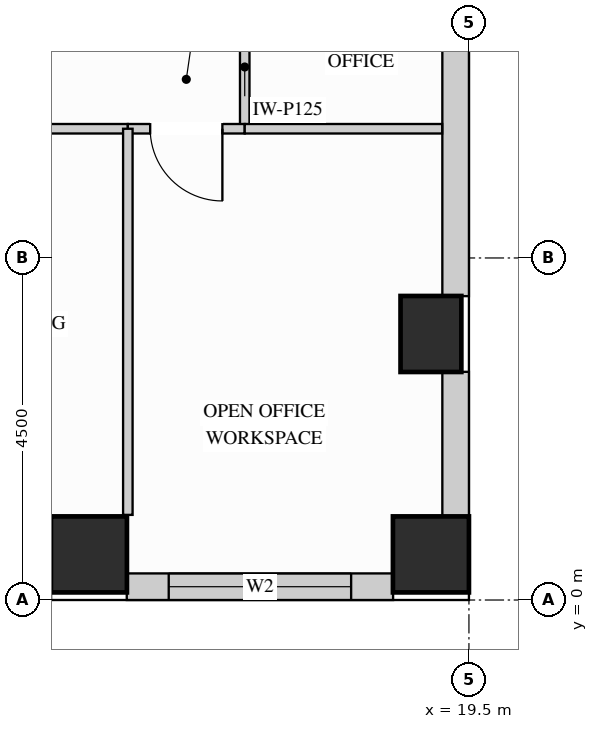
"""IFC4 building model, lengths in metres.
Left out: names, types, materials, properties, quantities, classifications, styles, units other than length and angle.
Written with IfcOpenShell. Run it as: python <this file> out.ifc"""

import sys

from ifc_helpers import new_model, si_unit, direction, frame, frame_2d, origin, origin_2d, place, context, subcontext, project, spatial, rectangle, extrude, source, transform, mapped, element, fill, save


model = new_model("IFC4")
c1 = context("Model", 3, precision=1e-05, world=origin(), true_north=direction((0.0, 1.0)))
c2 = subcontext(c1, "Body", "Model", "MODEL_VIEW")
j1 = project(units=[si_unit("LENGTHUNIT", "METRE"), si_unit("PLANEANGLEUNIT", "RADIAN")], contexts=[c1])
p1 = place(None, origin())
s1 = spatial("IfcSite", under=j1, at=p1, CompositionType="ELEMENT")
p2 = place(p1, origin())
s2 = spatial("IfcBuilding", under=s1, at=p2, CompositionType="ELEMENT")
p3 = place(p2, frame((0.0, 0.0, 204.3)))
s3 = spatial("IfcBuildingStorey", under=s2, at=p3, CompositionType="ELEMENT", Elevation=204.3)
m1 = source(origin(), c2, "Body", "SweptSolid", [
    extrude(rectangle(XDim=0.8, YDim=1.0, at=origin_2d()), origin(), (0.0, 0.0, 1.0), 3.32),
])
p4 = place(p3, frame((19.0, 3.5, 0.0), z_axis=(0.0, 0.0, 1.0), x_axis=(1.0, 0.0, 0.0)))
e1 = element("IfcColumn", 1, at=p4, inside=s3, PredefinedType="COLUMN", context=c2, shape_type="MappedRepresentation", body=[
    mapped(m1, transform((0.0, 0.0, 0.0), x_axis=(1.0, 0.0, 0.0), y_axis=(0.0, 1.0, 0.0), z_axis=(0.0, 0.0, 1.0))),
])
m2 = source(origin(), c2, "Body", "SweptSolid", [
    extrude(rectangle(XDim=1.0, YDim=1.0, at=origin_2d()), origin(), (0.0, 0.0, 1.0), 3.32),
])
for number, where, z_axis, x_axis in (
    (2, (14.5, 0.6, 0.0), (0.0, 0.0, 1.0), (1.0, 0.0, 0.0)),
    (3, (19.0, 0.6, 0.0), (0.0, 0.0, 1.0), (1.0, 0.0, 0.0)),
):
    element("IfcColumn", number, at=place(p3, frame(where, z_axis=z_axis, x_axis=x_axis)), inside=s3, PredefinedType="COLUMN", context=c2, shape_type="MappedRepresentation", body=[
        mapped(m2, transform((0.0, 0.0, 0.0), x_axis=(1.0, 0.0, 0.0), y_axis=(0.0, 1.0, 0.0), z_axis=(0.0, 0.0, 1.0))),
    ])
p5 = place(p3, frame((14.998, 0.175, 0.0), z_axis=(0.0, 0.0, 1.0), x_axis=(1.0, 0.0, 0.0)))
e4 = element("IfcWall", 4, at=p5, inside=s3, PredefinedType="SOLIDWALL", context=c2, shape_type="SweptSolid", body=[
    extrude(rectangle(XDim=3.504, YDim=0.35, at=frame_2d((1.752, 0.0))), origin(), (0.0, 0.0, 1.0), 2.532),
])
p6 = place(p5, frame((0.552, 0.0, 0.78)))
e5 = element("IfcOpeningElement", 5, at=p6, cuts=e4, PredefinedType="OPENING", context=c2, shape_type="SweptSolid", body=[
    extrude(rectangle(XDim=2.4, YDim=1.572, at=frame_2d((1.2, 0.786))), frame((0.0, 0.185, 0.0), z_axis=(0.0, -1.0, 0.0), x_axis=(1.0, 0.0, 0.0)), (0.0, 0.0, 1.0), 0.37),
])
m3 = source(origin(), c2, "Body", "SweptSolid", [
    extrude(rectangle(XDim=1.904, YDim=0.35, at=frame_2d((0.952, 0.0))), origin(), (0.0, 0.0, 1.0), 2.532),
])
p7 = place(p3, frame((19.325, 1.098, 0.0), z_axis=(0.0, 0.0, 1.0), x_axis=(0.0, 1.0, 0.0)))
e6 = element("IfcWall", 6, at=p7, inside=s3, PredefinedType="SOLIDWALL", context=c2, shape_type="MappedRepresentation", body=[
    mapped(m3, transform((0.0, 0.0, 0.0), x_axis=(1.0, 0.0, 0.0), y_axis=(0.0, 1.0, 0.0), z_axis=(0.0, 0.0, 1.0))),
])
m4 = source(origin(), c2, "Body", "SweptSolid", [
    extrude(rectangle(XDim=4.004, YDim=0.35, at=frame_2d((2.002, 0.0))), origin(), (0.0, 0.0, 1.0), 2.532),
])
p8 = place(p3, frame((19.325, 3.998, 0.0), z_axis=(0.0, 0.0, 1.0), x_axis=(0.0, 1.0, 0.0)))
e7 = element("IfcWall", 7, at=p8, inside=s3, PredefinedType="SOLIDWALL", context=c2, shape_type="MappedRepresentation", body=[
    mapped(m4, transform((0.0, 0.0, 0.0), x_axis=(1.0, 0.0, 0.0), y_axis=(0.0, 1.0, 0.0), z_axis=(0.0, 0.0, 1.0))),
])
p9 = place(p3, frame((16.55, 6.2, 0.0), z_axis=(0.0, 0.0, 1.0), x_axis=(0.0, 1.0, 0.0)))
e8 = element("IfcWall", 8, at=p9, inside=s3, PredefinedType="PARTITIONING", context=c2, shape_type="SweptSolid", body=[
    extrude(rectangle(XDim=4.4, YDim=0.125, at=frame_2d((2.2, 0.0))), origin(), (0.0, 0.0, 1.0), 3.305),
])
p10 = place(p9, frame((1.725, 0.0, 0.0)))
e9 = element("IfcOpeningElement", 9, at=p10, cuts=e8, PredefinedType="OPENING", context=c2, shape_type="SweptSolid", body=[
    extrude(rectangle(XDim=0.95, YDim=2.15, at=frame_2d((0.475, 1.075))), frame((0.0, 0.073, 0.0), z_axis=(0.0, -1.0, 0.0), x_axis=(1.0, 0.0, 0.0)), (0.0, 0.0, 1.0), 0.145),
])
p11 = place(p3, frame((10.875, 6.2, 0.0), z_axis=(0.0, 0.0, 1.0), x_axis=(1.0, 0.0, 0.0)))
e10 = element("IfcWall", 10, at=p11, inside=s3, PredefinedType="PARTITIONING", context=c2, shape_type="SweptSolid", body=[
    extrude(rectangle(XDim=4.137, YDim=0.125, at=frame_2d((2.068, 0.0))), origin(), (0.0, 0.0, 1.0), 2.768),
])
p12 = place(p11, frame((1.594, 0.0, 0.0)))
e11 = element("IfcOpeningElement", 11, at=p12, cuts=e10, PredefinedType="OPENING", context=c2, shape_type="SweptSolid", body=[
    extrude(rectangle(XDim=0.95, YDim=2.15, at=frame_2d((0.475, 1.075))), frame((0.0, 0.073, 0.0), z_axis=(0.0, -1.0, 0.0), x_axis=(1.0, 0.0, 0.0)), (0.0, 0.0, 1.0), 0.145),
])
p13 = place(p3, frame((15.012, 6.2, 0.0), z_axis=(0.0, 0.0, 1.0), x_axis=(1.0, 0.0, 0.0)))
e12 = element("IfcWall", 12, at=p13, inside=s3, PredefinedType="PARTITIONING", context=c2, shape_type="SweptSolid", body=[
    extrude(rectangle(XDim=1.538, YDim=0.125, at=frame_2d((0.769, 0.0))), origin(), (0.0, 0.0, 1.0), 2.768),
])
p14 = place(p13, frame((0.294, 0.0, 0.0)))
e13 = element("IfcOpeningElement", 13, at=p14, cuts=e12, PredefinedType="OPENING", context=c2, shape_type="SweptSolid", body=[
    extrude(rectangle(XDim=0.95, YDim=2.15, at=frame_2d((0.475, 1.075))), frame((0.0, 0.073, 0.0), z_axis=(0.0, -1.0, 0.0), x_axis=(1.0, 0.0, 0.0)), (0.0, 0.0, 1.0), 0.145),
])
m5 = source(origin(), c2, "Body", "SweptSolid", [
    extrude(rectangle(XDim=2.598, YDim=0.125, at=frame_2d((1.299, 0.0))), origin(), (0.0, 0.0, 1.0), 2.768),
])
p15 = place(p3, frame((16.55, 6.2, 0.0), z_axis=(0.0, 0.0, 1.0), x_axis=(1.0, 0.0, 0.0)))
e14 = element("IfcWall", 14, at=p15, inside=s3, PredefinedType="PARTITIONING", context=c2, shape_type="MappedRepresentation", body=[
    mapped(m5, transform((0.0, 0.0, 0.0), x_axis=(1.0, 0.0, 0.0), y_axis=(0.0, 1.0, 0.0), z_axis=(0.0, 0.0, 1.0))),
])
m6 = source(origin(), c2, "Body", "SweptSolid", [
    extrude(rectangle(XDim=5.08, YDim=0.125, at=frame_2d((2.54, 0.0))), origin(), (0.0, 0.0, 1.0), 3.305),
])
p16 = place(p3, frame((15.012, 1.12, 0.0), z_axis=(0.0, 0.0, 1.0), x_axis=(0.0, 1.0, 0.0)))
e15 = element("IfcWall", 15, at=p16, inside=s3, PredefinedType="PARTITIONING", context=c2, shape_type="MappedRepresentation", body=[
    mapped(m6, transform((0.0, 0.0, 0.0), x_axis=(1.0, 0.0, 0.0), y_axis=(0.0, 1.0, 0.0), z_axis=(0.0, 0.0, 1.0))),
])
m7 = source(origin(), c2, "Body", "SweptSolid", [
    extrude(rectangle(XDim=0.95, YDim=2.15, at=frame_2d((0.475, 1.075))), frame((0.0, 0.025, 0.0), z_axis=(0.0, -1.0, 0.0), x_axis=(1.0, 0.0, 0.0)), (0.0, 0.0, 1.0), 0.05),
])
p17 = place(p14, origin())
e16 = element("IfcDoor", 16, at=p17, inside=s3, OperationType="SINGLE_SWING_RIGHT", PredefinedType="DOOR", context=c2, shape_type="MappedRepresentation", body=[
    mapped(m7, transform((0.0, 0.0, 0.0), x_axis=(1.0, 0.0, 0.0), y_axis=(0.0, 1.0, 0.0), z_axis=(0.0, 0.0, 1.0))),
])
fill(e13, e16)
m8 = source(origin(), c2, "Body", "SweptSolid", [
    extrude(rectangle(XDim=2.4, YDim=1.572, at=frame_2d((1.2, 0.786))), frame((0.0, 0.03, 0.0), z_axis=(0.0, -1.0, 0.0), x_axis=(1.0, 0.0, 0.0)), (0.0, 0.0, 1.0), 0.06),
])
p18 = place(p6, origin())
e17 = element("IfcWindow", 17, at=p18, inside=s3, PartitioningType="SINGLE_PANEL", PredefinedType="WINDOW", context=c2, shape_type="MappedRepresentation", body=[
    mapped(m8, transform((0.0, 0.0, 0.0), x_axis=(1.0, 0.0, 0.0), y_axis=(0.0, 1.0, 0.0), z_axis=(0.0, 0.0, 1.0))),
])
fill(e5, e17)
save(model, sys.argv[1])
